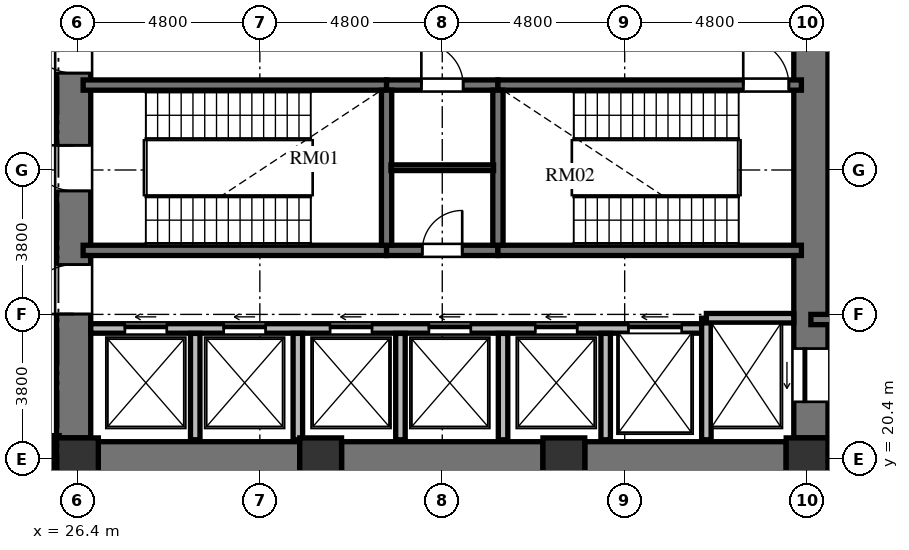
"""IFC4 building model, lengths in metres.
Left out: names, types, materials, properties, quantities, classifications, styles, units other than length and angle.
Written with IfcOpenShell. Run it as: python <this file> out.ifc"""

import sys

from ifc_helpers import new_model, si_unit, direction, frame, frame_2d, origin, origin_2d, place, context, subcontext, project, spatial, rectangle, extrude, element, fill, save


model = new_model("IFC4")
c1 = context("Model", 3, precision=1e-05, world=origin(), true_north=direction((0.0, 1.0)))
c2 = subcontext(c1, "Body", "Model", "MODEL_VIEW")
j1 = project(units=[si_unit("LENGTHUNIT", "METRE"), si_unit("PLANEANGLEUNIT", "RADIAN")], contexts=[c1])
p1 = place(None, origin())
s1 = spatial("IfcSite", under=j1, at=p1, CompositionType="ELEMENT")
p2 = place(p1, origin())
s2 = spatial("IfcBuilding", under=s1, at=p2, CompositionType="ELEMENT")
p3 = place(p2, frame((0.0, 0.0, 20.4)))
s3 = spatial("IfcBuildingStorey", under=s2, at=p3, CompositionType="ELEMENT", Elevation=20.4)
for number, where, z_axis, x_axis in (
    (1, (26.4, 20.4, 0.0), (0.0, 0.0, 1.0), (1.0, 0.0, 0.0)),
    (2, (32.8, 20.4, 0.0), (0.0, 0.0, 1.0), (1.0, 0.0, 0.0)),
    (3, (39.2, 20.4, 0.0), (0.0, 0.0, 1.0), (1.0, 0.0, 0.0)),
    (4, (45.6, 20.4, 0.0), (0.0, 0.0, 1.0), (1.0, 0.0, 0.0)),
):
    element("IfcColumn", number, at=place(p3, frame(where, z_axis=z_axis, x_axis=x_axis)), inside=s3, PredefinedType="COLUMN", context=c2, shape_type="SweptSolid", body=[
        extrude(rectangle(XDim=1.1, YDim=1.1, at=origin_2d()), origin(), (0.0, 0.0, 1.0), 4.8),
    ])
p4 = place(p3, frame((26.3, 20.95, 0.0), z_axis=(0.0, 0.0, 1.0), x_axis=(0.0, 1.0, 0.0)))
e5 = element("IfcWall", 5, at=p4, inside=s3, PredefinedType="SHEAR", context=c2, shape_type="SweptSolid", body=[
    extrude(rectangle(XDim=14.1, YDim=0.9, at=frame_2d((7.05, 0.0))), origin(), (0.0, 0.0, 1.0), 4.8),
])
p5 = place(p4, frame((6.5, 0.0, 0.0)))
e6 = element("IfcOpeningElement", 6, at=p5, cuts=e5, PredefinedType="OPENING", context=c2, shape_type="SweptSolid", body=[
    extrude(rectangle(XDim=1.2, YDim=2.15, at=frame_2d((0.6, 1.075))), frame((0.0, 0.46, 0.0), z_axis=(0.0, -1.0, 0.0), x_axis=(1.0, 0.0, 0.0)), (0.0, 0.0, 1.0), 0.92),
])
p6 = place(p4, frame((9.6, 0.0, 0.0)))
e7 = element("IfcOpeningElement", 7, at=p6, cuts=e5, PredefinedType="OPENING", context=c2, shape_type="SweptSolid", body=[
    extrude(rectangle(XDim=1.3, YDim=2.2, at=frame_2d((0.65, 1.1))), frame((0.0, 0.46, 0.0), z_axis=(0.0, -1.0, 0.0), x_axis=(1.0, 0.0, 0.0)), (0.0, 0.0, 1.0), 0.92),
])
p7 = place(p4, frame((3.26, 0.0, 0.0)))
e8 = element("IfcOpeningElement", 8, at=p7, cuts=e5, PredefinedType="OPENING", context=c2, shape_type="SweptSolid", body=[
    extrude(rectangle(XDim=1.3, YDim=2.2, at=frame_2d((0.65, 1.1))), frame((0.0, 0.46, 0.0), z_axis=(0.0, -1.0, 0.0), x_axis=(1.0, 0.0, 0.0)), (0.0, 0.0, 1.0), 0.92),
])
p8 = place(p3, frame((45.7, 20.95, 0.0), z_axis=(0.0, 0.0, 1.0), x_axis=(0.0, 1.0, 0.0)))
e9 = element("IfcWall", 9, at=p8, inside=s3, PredefinedType="SHEAR", context=c2, shape_type="SweptSolid", body=[
    extrude(rectangle(XDim=14.1, YDim=0.9, at=frame_2d((7.05, 0.0))), origin(), (0.0, 0.0, 1.0), 4.8),
])
p9 = place(p8, frame((11.75, 0.0, 0.0)))
e10 = element("IfcOpeningElement", 10, at=p9, cuts=e9, PredefinedType="OPENING", context=c2, shape_type="SweptSolid", body=[
    extrude(rectangle(XDim=1.4, YDim=2.3, at=frame_2d((0.7, 1.15))), frame((0.0, 0.46, 0.0), z_axis=(0.0, -1.0, 0.0), x_axis=(1.0, 0.0, 0.0)), (0.0, 0.0, 1.0), 0.92),
])
p10 = place(p8, frame((0.95, 0.0, 0.0)))
e11 = element("IfcOpeningElement", 11, at=p10, cuts=e9, PredefinedType="OPENING", context=c2, shape_type="SweptSolid", body=[
    extrude(rectangle(XDim=1.4, YDim=2.3, at=frame_2d((0.7, 1.15))), frame((0.0, 0.46, 0.0), z_axis=(0.0, -1.0, 0.0), x_axis=(1.0, 0.0, 0.0)), (0.0, 0.0, 1.0), 0.92),
])
p11 = place(p3, frame((26.95, 20.4, 0.0), z_axis=(0.0, 0.0, 1.0), x_axis=(1.0, 0.0, 0.0)))
e12 = element("IfcWall", 12, at=p11, inside=s3, PredefinedType="SHEAR", context=c2, shape_type="SweptSolid", body=[
    extrude(rectangle(XDim=5.3, YDim=0.9, at=frame_2d((2.65, 0.0))), origin(), (0.0, 0.0, 1.0), 4.8),
])
p12 = place(p3, frame((33.35, 20.4, 0.0), z_axis=(0.0, 0.0, 1.0), x_axis=(1.0, 0.0, 0.0)))
e13 = element("IfcWall", 13, at=p12, inside=s3, PredefinedType="SHEAR", context=c2, shape_type="SweptSolid", body=[
    extrude(rectangle(XDim=5.3, YDim=0.9, at=frame_2d((2.65, 0.0))), origin(), (0.0, 0.0, 1.0), 4.8),
])
p13 = place(p3, frame((39.75, 20.4, 0.0), z_axis=(0.0, 0.0, 1.0), x_axis=(1.0, 0.0, 0.0)))
e14 = element("IfcWall", 14, at=p13, inside=s3, PredefinedType="SHEAR", context=c2, shape_type="SweptSolid", body=[
    extrude(rectangle(XDim=5.3, YDim=0.9, at=frame_2d((2.65, 0.0))), origin(), (0.0, 0.0, 1.0), 4.8),
])
p14 = place(p3, frame((26.55, 30.235, 0.0), z_axis=(0.0, 0.0, 1.0), x_axis=(1.0, 0.0, 0.0)))
e15 = element("IfcWall", 15, at=p14, inside=s3, PredefinedType="SHEAR", context=c2, shape_type="SweptSolid", body=[
    extrude(rectangle(XDim=7.985, YDim=0.27, at=frame_2d((3.992, 0.0))), origin(), (0.0, 0.0, 1.0), 4.8),
])
p15 = place(p3, frame((34.535, 30.235, 0.0), z_axis=(0.0, 0.0, 1.0), x_axis=(1.0, 0.0, 0.0)))
e16 = element("IfcWall", 16, at=p15, inside=s3, PredefinedType="SHEAR", context=c2, shape_type="SweptSolid", body=[
    extrude(rectangle(XDim=2.93, YDim=0.27, at=frame_2d((1.465, 0.0))), origin(), (0.0, 0.0, 1.0), 4.8),
])
p16 = place(p15, frame((0.915, 0.0, 0.0)))
e17 = element("IfcOpeningElement", 17, at=p16, cuts=e16, PredefinedType="OPENING", context=c2, shape_type="SweptSolid", body=[
    extrude(rectangle(XDim=1.1, YDim=2.15, at=frame_2d((0.55, 1.075))), frame((0.0, 0.145, 0.0), z_axis=(0.0, -1.0, 0.0), x_axis=(1.0, 0.0, 0.0)), (0.0, 0.0, 1.0), 0.29),
])
p17 = place(p3, frame((37.465, 30.235, 0.0), z_axis=(0.0, 0.0, 1.0), x_axis=(1.0, 0.0, 0.0)))
e18 = element("IfcWall", 18, at=p17, inside=s3, PredefinedType="SHEAR", context=c2, shape_type="SweptSolid", body=[
    extrude(rectangle(XDim=7.985, YDim=0.27, at=frame_2d((3.992, 0.0))), origin(), (0.0, 0.0, 1.0), 4.8),
])
p18 = place(p17, frame((6.455, 0.0, 0.0)))
e19 = element("IfcOpeningElement", 19, at=p18, cuts=e18, PredefinedType="OPENING", context=c2, shape_type="SweptSolid", body=[
    extrude(rectangle(XDim=1.2, YDim=2.15, at=frame_2d((0.6, 1.075))), frame((0.0, 0.145, 0.0), z_axis=(0.0, -1.0, 0.0), x_axis=(1.0, 0.0, 0.0)), (0.0, 0.0, 1.0), 0.29),
])
p19 = place(p3, frame((26.55, 25.885, 0.0), z_axis=(0.0, 0.0, 1.0), x_axis=(1.0, 0.0, 0.0)))
e20 = element("IfcWall", 20, at=p19, inside=s3, PredefinedType="SHEAR", context=c2, shape_type="SweptSolid", body=[
    extrude(rectangle(XDim=7.985, YDim=0.27, at=frame_2d((3.992, 0.0))), origin(), (0.0, 0.0, 1.0), 4.8),
])
p20 = place(p3, frame((34.535, 25.885, 0.0), z_axis=(0.0, 0.0, 1.0), x_axis=(1.0, 0.0, 0.0)))
e21 = element("IfcWall", 21, at=p20, inside=s3, PredefinedType="SHEAR", context=c2, shape_type="SweptSolid", body=[
    extrude(rectangle(XDim=2.93, YDim=0.27, at=frame_2d((1.465, 0.0))), origin(), (0.0, 0.0, 1.0), 4.8),
])
p21 = place(p20, frame((0.94, 0.0, 0.0)))
e22 = element("IfcOpeningElement", 22, at=p21, cuts=e21, PredefinedType="OPENING", context=c2, shape_type="SweptSolid", body=[
    extrude(rectangle(XDim=1.05, YDim=2.15, at=frame_2d((0.525, 1.075))), frame((0.0, 0.145, 0.0), z_axis=(0.0, -1.0, 0.0), x_axis=(1.0, 0.0, 0.0)), (0.0, 0.0, 1.0), 0.29),
])
p22 = place(p3, frame((37.465, 25.885, 0.0), z_axis=(0.0, 0.0, 1.0), x_axis=(1.0, 0.0, 0.0)))
e23 = element("IfcWall", 23, at=p22, inside=s3, PredefinedType="SHEAR", context=c2, shape_type="SweptSolid", body=[
    extrude(rectangle(XDim=7.985, YDim=0.27, at=frame_2d((3.992, 0.0))), origin(), (0.0, 0.0, 1.0), 4.8),
])
for number, where, z_axis, x_axis in (
    (24, (34.535, 26.02, 0.0), (0.0, 0.0, 1.0), (0.0, 1.0, 0.0)),
    (25, (37.465, 26.02, 0.0), (0.0, 0.0, 1.0), (0.0, 1.0, 0.0)),
):
    element("IfcWall", number, at=place(p3, frame(where, z_axis=z_axis, x_axis=x_axis)), inside=s3, PredefinedType="SHEAR", context=c2, shape_type="SweptSolid", body=[
        extrude(rectangle(XDim=4.08, YDim=0.27, at=frame_2d((2.04, 0.0))), origin(), (0.0, 0.0, 1.0), 4.8),
    ])
p23 = place(p3, frame((34.65, 28.06, 0.0), z_axis=(0.0, 0.0, 1.0), x_axis=(1.0, 0.0, 0.0)))
e26 = element("IfcWall", 26, at=p23, inside=s3, PredefinedType="PARTITIONING", context=c2, shape_type="SweptSolid", body=[
    extrude(rectangle(XDim=2.7, YDim=0.15, at=frame_2d((1.35, 0.0))), origin(), (0.0, 0.0, 1.0), 4.58),
])
p24 = place(p3, frame((26.75, 23.83, 0.0), z_axis=(0.0, 0.0, 1.0), x_axis=(1.0, 0.0, 0.0)))
e27 = element("IfcWall", 27, at=p24, inside=s3, PredefinedType="SOLIDWALL", context=c2, shape_type="SweptSolid", body=[
    extrude(rectangle(XDim=16.2, YDim=0.25, at=frame_2d((8.1, 0.0))), origin(), (0.0, 0.0, 1.0), 4.58),
])
p25 = place(p24, frame((0.9, 0.0, 0.0)))
e28 = element("IfcOpeningElement", 28, at=p25, cuts=e27, PredefinedType="OPENING", context=c2, shape_type="SweptSolid", body=[
    extrude(rectangle(XDim=1.1, YDim=2.2, at=frame_2d((0.55, 1.1))), frame((0.0, 0.135, 0.0), z_axis=(0.0, -1.0, 0.0), x_axis=(1.0, 0.0, 0.0)), (0.0, 0.0, 1.0), 0.27),
])
p26 = place(p24, frame((3.5, 0.0, 0.0)))
e29 = element("IfcOpeningElement", 29, at=p26, cuts=e27, PredefinedType="OPENING", context=c2, shape_type="SweptSolid", body=[
    extrude(rectangle(XDim=1.1, YDim=2.2, at=frame_2d((0.55, 1.1))), frame((0.0, 0.135, 0.0), z_axis=(0.0, -1.0, 0.0), x_axis=(1.0, 0.0, 0.0)), (0.0, 0.0, 1.0), 0.27),
])
p27 = place(p24, frame((6.3, 0.0, 0.0)))
e30 = element("IfcOpeningElement", 30, at=p27, cuts=e27, PredefinedType="OPENING", context=c2, shape_type="SweptSolid", body=[
    extrude(rectangle(XDim=1.1, YDim=2.2, at=frame_2d((0.55, 1.1))), frame((0.0, 0.135, 0.0), z_axis=(0.0, -1.0, 0.0), x_axis=(1.0, 0.0, 0.0)), (0.0, 0.0, 1.0), 0.27),
])
p28 = place(p24, frame((8.9, 0.0, 0.0)))
e31 = element("IfcOpeningElement", 31, at=p28, cuts=e27, PredefinedType="OPENING", context=c2, shape_type="SweptSolid", body=[
    extrude(rectangle(XDim=1.1, YDim=2.2, at=frame_2d((0.55, 1.1))), frame((0.0, 0.135, 0.0), z_axis=(0.0, -1.0, 0.0), x_axis=(1.0, 0.0, 0.0)), (0.0, 0.0, 1.0), 0.27),
])
p29 = place(p24, frame((11.7, 0.0, 0.0)))
e32 = element("IfcOpeningElement", 32, at=p29, cuts=e27, PredefinedType="OPENING", context=c2, shape_type="SweptSolid", body=[
    extrude(rectangle(XDim=1.1, YDim=2.2, at=frame_2d((0.55, 1.1))), frame((0.0, 0.135, 0.0), z_axis=(0.0, -1.0, 0.0), x_axis=(1.0, 0.0, 0.0)), (0.0, 0.0, 1.0), 0.27),
])
p30 = place(p24, frame((14.15, 0.0, 0.0)))
e33 = element("IfcOpeningElement", 33, at=p30, cuts=e27, PredefinedType="OPENING", context=c2, shape_type="SweptSolid", body=[
    extrude(rectangle(XDim=1.4, YDim=2.3, at=frame_2d((0.7, 1.15))), frame((0.0, 0.135, 0.0), z_axis=(0.0, -1.0, 0.0), x_axis=(1.0, 0.0, 0.0)), (0.0, 0.0, 1.0), 0.27),
])
p31 = place(p3, frame((42.95, 20.9, 0.0), z_axis=(0.0, 0.0, 1.0), x_axis=(0.0, 1.0, 0.0)))
e34 = element("IfcWall", 34, at=p31, inside=s3, PredefinedType="SOLIDWALL", context=c2, shape_type="SweptSolid", body=[
    extrude(rectangle(XDim=3.2, YDim=0.25, at=frame_2d((1.6, 0.0))), origin(), (0.0, 0.0, 1.0), 4.58),
])
p32 = place(p3, frame((42.95, 24.1, 0.0), z_axis=(0.0, 0.0, 1.0), x_axis=(1.0, 0.0, 0.0)))
e35 = element("IfcWall", 35, at=p32, inside=s3, PredefinedType="SOLIDWALL", context=c2, shape_type="SweptSolid", body=[
    extrude(rectangle(XDim=2.3, YDim=0.25, at=frame_2d((1.15, 0.0))), origin(), (0.0, 0.0, 1.0), 4.58),
])
for number, where, z_axis, x_axis in (
    (36, (29.5, 20.9, 0.0), (0.0, 0.0, 1.0), (0.0, 1.0, 0.0)),
    (37, (32.2, 20.9, 0.0), (0.0, 0.0, 1.0), (0.0, 1.0, 0.0)),
    (38, (34.9, 20.9, 0.0), (0.0, 0.0, 1.0), (0.0, 1.0, 0.0)),
    (39, (37.6, 20.9, 0.0), (0.0, 0.0, 1.0), (0.0, 1.0, 0.0)),
    (40, (40.3, 20.9, 0.0), (0.0, 0.0, 1.0), (0.0, 1.0, 0.0)),
):
    element("IfcWall", number, at=place(p3, frame(where, z_axis=z_axis, x_axis=x_axis)), inside=s3, PredefinedType="SOLIDWALL", context=c2, shape_type="SweptSolid", body=[
        extrude(rectangle(XDim=2.8, YDim=0.25, at=frame_2d((1.4, 0.0))), origin(), (0.0, 0.0, 1.0), 4.58),
    ])
p33 = place(p3, frame((45.7, 24.065, 0.0), z_axis=(0.0, 0.0, 1.0), x_axis=(1.0, 0.0, 0.0)))
e41 = element("IfcWall", 41, at=p33, inside=s3, PredefinedType="SHEAR", context=c2, shape_type="SweptSolid", body=[
    extrude(rectangle(XDim=4.715, YDim=0.27, at=frame_2d((2.357, 0.0))), origin(), (0.0, 0.0, 1.0), 4.8),
])
p34 = place(p3, frame((45.7, 20.02, 0.0), z_axis=(0.0, 0.0, 1.0), x_axis=(1.0, 0.0, 0.0)))
e42 = element("IfcWall", 42, at=p34, inside=s3, PredefinedType="SOLIDWALL", context=c2, shape_type="SweptSolid", body=[
    extrude(rectangle(XDim=4.715, YDim=0.25, at=frame_2d((2.357, 0.0))), origin(), (0.0, 0.0, 1.0), 4.58),
])
p35 = place(p3, frame((25.83, 21.01, 0.0), z_axis=(0.0, 0.0, 1.0), x_axis=(0.0, -1.0, 0.0)))
e43 = element("IfcWall", 43, at=p35, inside=s3, PredefinedType="PARTITIONING", context=c2, shape_type="SweptSolid", body=[
    extrude(rectangle(XDim=1.22, YDim=0.18, at=frame_2d((0.61, 0.0))), origin(), (0.0, 0.0, 1.0), 4.58),
])
p36 = place(p5, origin())
e44 = element("IfcDoor", 44, at=p36, inside=s3, OperationType="SINGLE_SWING_RIGHT", PredefinedType="DOOR", context=c2, shape_type="SweptSolid", body=[
    extrude(rectangle(XDim=1.2, YDim=2.15, at=frame_2d((0.6, 1.075))), frame((0.0, 0.025, 0.0), z_axis=(0.0, -1.0, 0.0), x_axis=(1.0, 0.0, 0.0)), (0.0, 0.0, 1.0), 0.05),
])
fill(e6, e44)
p37 = place(p18, origin())
e45 = element("IfcDoor", 45, at=p37, inside=s3, OperationType="SINGLE_SWING_LEFT", PredefinedType="DOOR", context=c2, shape_type="SweptSolid", body=[
    extrude(rectangle(XDim=1.2, YDim=2.15, at=frame_2d((0.6, 1.075))), frame((0.0, 0.025, 0.0), z_axis=(0.0, -1.0, 0.0), x_axis=(1.0, 0.0, 0.0)), (0.0, 0.0, 1.0), 0.05),
])
fill(e19, e45)
p38 = place(p21, origin())
e46 = element("IfcDoor", 46, at=p38, inside=s3, OperationType="SINGLE_SWING_RIGHT", PredefinedType="DOOR", context=c2, shape_type="SweptSolid", body=[
    extrude(rectangle(XDim=1.05, YDim=2.15, at=frame_2d((0.525, 1.075))), frame((0.0, 0.025, 0.0), z_axis=(0.0, -1.0, 0.0), x_axis=(1.0, 0.0, 0.0)), (0.0, 0.0, 1.0), 0.05),
])
fill(e22, e46)
p39 = place(p16, origin())
e47 = element("IfcDoor", 47, at=p39, inside=s3, OperationType="SINGLE_SWING_LEFT", PredefinedType="DOOR", context=c2, shape_type="SweptSolid", body=[
    extrude(rectangle(XDim=1.1, YDim=2.15, at=frame_2d((0.55, 1.075))), frame((0.0, 0.025, 0.0), z_axis=(0.0, -1.0, 0.0), x_axis=(1.0, 0.0, 0.0)), (0.0, 0.0, 1.0), 0.05),
])
fill(e17, e47)
p40 = place(p6, origin())
e48 = element("IfcDoor", 48, at=p40, inside=s3, OperationType="SINGLE_SWING_RIGHT", PredefinedType="DOOR", context=c2, shape_type="SweptSolid", body=[
    extrude(rectangle(XDim=1.3, YDim=2.2, at=frame_2d((0.65, 1.1))), frame((0.0, 0.025, 0.0), z_axis=(0.0, -1.0, 0.0), x_axis=(1.0, 0.0, 0.0)), (0.0, 0.0, 1.0), 0.05),
])
fill(e7, e48)
p41 = place(p7, origin())
e49 = element("IfcDoor", 49, at=p41, inside=s3, OperationType="SINGLE_SWING_LEFT", PredefinedType="DOOR", context=c2, shape_type="SweptSolid", body=[
    extrude(rectangle(XDim=1.3, YDim=2.2, at=frame_2d((0.65, 1.1))), frame((0.0, 0.025, 0.0), z_axis=(0.0, -1.0, 0.0), x_axis=(1.0, 0.0, 0.0)), (0.0, 0.0, 1.0), 0.05),
])
fill(e8, e49)
p42 = place(p25, origin())
e50 = element("IfcDoor", 50, at=p42, inside=s3, OperationType="SLIDING_TO_LEFT", PredefinedType="DOOR", context=c2, shape_type="SweptSolid", body=[
    extrude(rectangle(XDim=1.1, YDim=2.2, at=frame_2d((0.55, 1.1))), frame((0.0, 0.025, 0.0), z_axis=(0.0, -1.0, 0.0), x_axis=(1.0, 0.0, 0.0)), (0.0, 0.0, 1.0), 0.05),
])
fill(e28, e50)
p43 = place(p26, origin())
e51 = element("IfcDoor", 51, at=p43, inside=s3, OperationType="SLIDING_TO_LEFT", PredefinedType="DOOR", context=c2, shape_type="SweptSolid", body=[
    extrude(rectangle(XDim=1.1, YDim=2.2, at=frame_2d((0.55, 1.1))), frame((0.0, 0.025, 0.0), z_axis=(0.0, -1.0, 0.0), x_axis=(1.0, 0.0, 0.0)), (0.0, 0.0, 1.0), 0.05),
])
fill(e29, e51)
p44 = place(p27, origin())
e52 = element("IfcDoor", 52, at=p44, inside=s3, OperationType="SLIDING_TO_LEFT", PredefinedType="DOOR", context=c2, shape_type="SweptSolid", body=[
    extrude(rectangle(XDim=1.1, YDim=2.2, at=frame_2d((0.55, 1.1))), frame((0.0, 0.025, 0.0), z_axis=(0.0, -1.0, 0.0), x_axis=(1.0, 0.0, 0.0)), (0.0, 0.0, 1.0), 0.05),
])
fill(e30, e52)
p45 = place(p28, origin())
e53 = element("IfcDoor", 53, at=p45, inside=s3, OperationType="SLIDING_TO_LEFT", PredefinedType="DOOR", context=c2, shape_type="SweptSolid", body=[
    extrude(rectangle(XDim=1.1, YDim=2.2, at=frame_2d((0.55, 1.1))), frame((0.0, 0.025, 0.0), z_axis=(0.0, -1.0, 0.0), x_axis=(1.0, 0.0, 0.0)), (0.0, 0.0, 1.0), 0.05),
])
fill(e31, e53)
p46 = place(p29, origin())
e54 = element("IfcDoor", 54, at=p46, inside=s3, OperationType="SLIDING_TO_LEFT", PredefinedType="DOOR", context=c2, shape_type="SweptSolid", body=[
    extrude(rectangle(XDim=1.1, YDim=2.2, at=frame_2d((0.55, 1.1))), frame((0.0, 0.025, 0.0), z_axis=(0.0, -1.0, 0.0), x_axis=(1.0, 0.0, 0.0)), (0.0, 0.0, 1.0), 0.05),
])
fill(e32, e54)
p47 = place(p10, origin())
e55 = element("IfcDoor", 55, at=p47, inside=s3, OperationType="SLIDING_TO_LEFT", PredefinedType="DOOR", context=c2, shape_type="SweptSolid", body=[
    extrude(rectangle(XDim=1.4, YDim=2.3, at=frame_2d((0.7, 1.15))), frame((0.0, 0.025, 0.0), z_axis=(0.0, -1.0, 0.0), x_axis=(1.0, 0.0, 0.0)), (0.0, 0.0, 1.0), 0.05),
])
fill(e11, e55)
p48 = place(p30, origin())
e56 = element("IfcDoor", 56, at=p48, inside=s3, OperationType="SLIDING_TO_LEFT", PredefinedType="DOOR", context=c2, shape_type="SweptSolid", body=[
    extrude(rectangle(XDim=1.4, YDim=2.3, at=frame_2d((0.7, 1.15))), frame((0.0, 0.025, 0.0), z_axis=(0.0, -1.0, 0.0), x_axis=(1.0, 0.0, 0.0)), (0.0, 0.0, 1.0), 0.05),
])
fill(e33, e56)
save(model, sys.argv[1])
